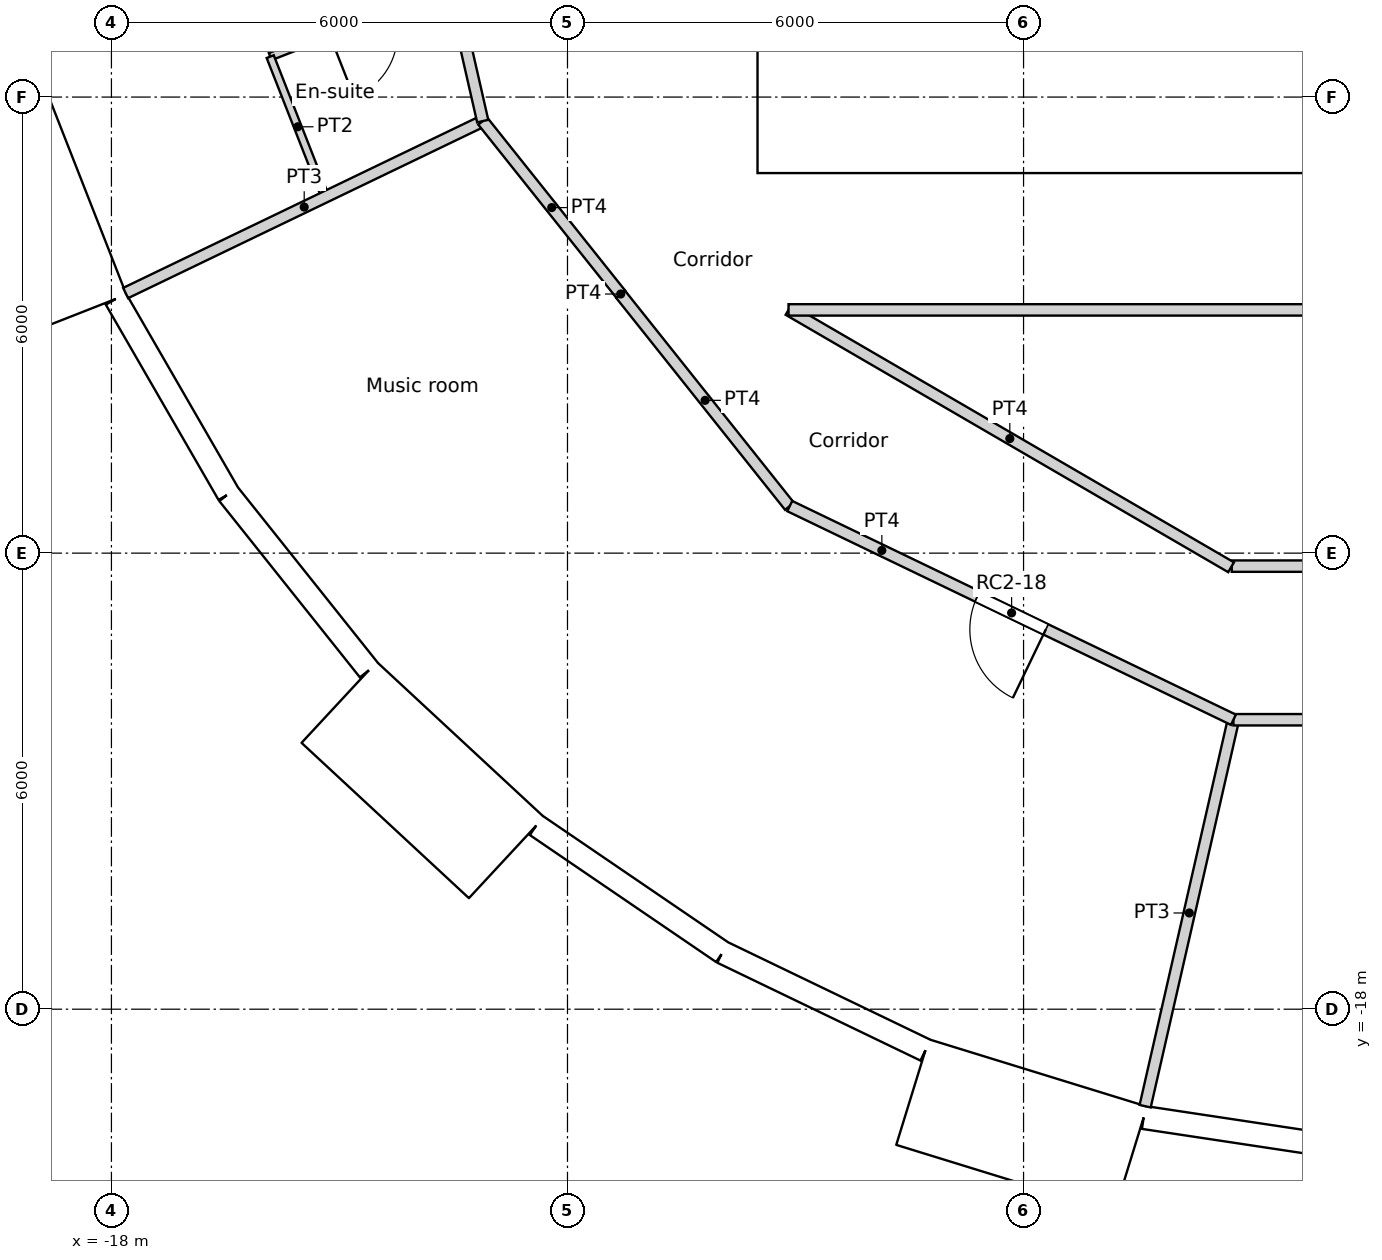
"""IFC4 building model, lengths in metres.
Left out: names, types, materials, properties, quantities, classifications, styles, units other than length and angle.
Written with IfcOpenShell. Run it as: python <this file> out.ifc"""

import sys

from ifc_helpers import new_model, si_unit, direction, frame, frame_2d, origin, origin_2d, place, context, subcontext, project, spatial, rectangle, circle, extrude, element, fill, save


model = new_model("IFC4")
c1 = context("Model", 3, precision=1e-05, world=origin(), true_north=direction((0.0, 1.0)))
c2 = subcontext(c1, "Body", "Model", "MODEL_VIEW")
j1 = project(units=[si_unit("LENGTHUNIT", "METRE"), si_unit("PLANEANGLEUNIT", "RADIAN")], contexts=[c1])
p1 = place(None, origin())
s1 = spatial("IfcSite", under=j1, at=p1, CompositionType="ELEMENT")
p2 = place(p1, origin())
s2 = spatial("IfcBuilding", under=s1, at=p2, CompositionType="ELEMENT")
p3 = place(p2, frame((0.0, 0.0, 241.8)))
s3 = spatial("IfcBuildingStorey", under=s2, at=p3, CompositionType="ELEMENT", Elevation=241.8)
for number, where, z_axis, x_axis in (
    (1, (-16.958, -8.167, 0.0), (0.0, 0.0, 1.0), (1.0, 0.0, 0.0)),
    (2, (-13.798, -12.802, 0.0), (0.0, 0.0, 1.0), (1.0, 0.0, 0.0)),
    (3, (-9.411, -16.301, 0.0), (0.0, 0.0, 1.0), (1.0, 0.0, 0.0)),
    (4, (-4.188, -18.35, 0.0), (0.0, 0.0, 1.0), (1.0, 0.0, 0.0)),
):
    element("IfcColumn", number, at=place(p3, frame(where, z_axis=z_axis, x_axis=x_axis)), inside=s3, PredefinedType="COLUMN", context=c2, shape_type="SweptSolid", body=[
        extrude(circle(Radius=0.55, at=origin_2d()), origin(), (0.0, 0.0, 1.0), 3.6),
    ])
p4 = place(p3, frame((-19.576, -6.072, -0.35), z_axis=(0.0, 0.0, 1.0), x_axis=(0.36537792632, -0.93085926485, 0.0)))
e5 = element("IfcWall", 5, at=p4, inside=s3, PredefinedType="ELEMENTEDWALL", context=c2, shape_type="SweptSolid", body=[
    extrude(rectangle(XDim=3.0, YDim=1.45, at=frame_2d((1.5, 0.0))), origin(), (0.0, 0.0, 1.0), 3.6),
])
p5 = place(p4, frame((1.5, 0.0, 1.9)))
e6 = element("IfcOpeningElement", 6, at=p5, cuts=e5, PredefinedType="OPENING", context=c2, shape_type="SweptSolid", body=[
    extrude(circle(Radius=0.9, at=origin_2d()), frame((0.0, 0.735, 0.0), z_axis=(0.0, -1.0, 0.0), x_axis=(1.0, 0.0, 0.0)), (0.0, 0.0, 1.0), 1.47),
])
p6 = place(p3, frame((-17.941, -8.657, 0.0), z_axis=(0.0, 0.0, 1.0), x_axis=(0.499950756475, -0.86605383268, 0.0)))
e7 = element("IfcWall", 7, at=p6, inside=s3, PredefinedType="SOLIDWALL", context=c2, shape_type="SweptSolid", body=[
    extrude(rectangle(XDim=2.962, YDim=0.3, at=frame_2d((1.481, 0.0))), origin(), (0.0, 0.0, 1.0), 3.25),
])
p7 = place(p6, frame((1.481, 0.0, 1.55)))
e8 = element("IfcOpeningElement", 8, at=p7, cuts=e7, PredefinedType="OPENING", context=c2, shape_type="SweptSolid", body=[
    extrude(circle(Radius=0.9, at=origin_2d()), frame((0.0, 0.16, 0.0), z_axis=(0.0, -1.0, 0.0), x_axis=(1.0, 0.0, 0.0)), (0.0, 0.0, 1.0), 0.32),
])
p8 = place(p3, frame((-16.46, -11.222, 0.0), z_axis=(0.0, 0.0, 1.0), x_axis=(0.623498236992, -0.781824755599, 0.0)))
e9 = element("IfcWall", 9, at=p8, inside=s3, PredefinedType="SOLIDWALL", context=c2, shape_type="SweptSolid", body=[
    extrude(rectangle(XDim=2.962, YDim=0.3, at=frame_2d((1.481, 0.0))), origin(), (0.0, 0.0, 1.0), 3.25),
])
p9 = place(p8, frame((1.481, 0.0, 1.55)))
e10 = element("IfcOpeningElement", 10, at=p9, cuts=e9, PredefinedType="OPENING", context=c2, shape_type="SweptSolid", body=[
    extrude(circle(Radius=0.9, at=origin_2d()), frame((0.0, 0.16, 0.0), z_axis=(0.0, -1.0, 0.0), x_axis=(1.0, 0.0, 0.0)), (0.0, 0.0, 1.0), 0.32),
])
p10 = place(p3, frame((-15.003, -13.964, -0.35), z_axis=(0.0, 0.0, 1.0), x_axis=(0.733022439167, -0.680204457261, 0.0)))
e11 = element("IfcWall", 11, at=p10, inside=s3, PredefinedType="ELEMENTEDWALL", context=c2, shape_type="SweptSolid", body=[
    extrude(rectangle(XDim=3.0, YDim=1.45, at=frame_2d((1.5, 0.0))), origin(), (0.0, 0.0, 1.0), 3.6),
])
p11 = place(p10, frame((1.5, 0.0, 1.9)))
e12 = element("IfcOpeningElement", 12, at=p11, cuts=e11, PredefinedType="OPENING", context=c2, shape_type="SweptSolid", body=[
    extrude(circle(Radius=0.9, at=origin_2d()), frame((0.0, 0.735, 0.0), z_axis=(0.0, -1.0, 0.0), x_axis=(1.0, 0.0, 0.0)), (0.0, 0.0, 1.0), 1.47),
])
p12 = place(p3, frame((-12.408, -15.584, 0.0), z_axis=(0.0, 0.0, 1.0), x_axis=(0.826236061068, -0.563324037646, 0.0)))
e13 = element("IfcWall", 13, at=p12, inside=s3, PredefinedType="SOLIDWALL", context=c2, shape_type="SweptSolid", body=[
    extrude(rectangle(XDim=2.962, YDim=0.3, at=frame_2d((1.481, 0.0))), origin(), (0.0, 0.0, 1.0), 3.25),
])
p13 = place(p12, frame((1.481, 0.0, 1.55)))
e14 = element("IfcOpeningElement", 14, at=p13, cuts=e13, PredefinedType="OPENING", context=c2, shape_type="SweptSolid", body=[
    extrude(circle(Radius=0.9, at=origin_2d()), frame((0.0, 0.16, 0.0), z_axis=(0.0, -1.0, 0.0), x_axis=(1.0, 0.0, 0.0)), (0.0, 0.0, 1.0), 0.32),
])
p14 = place(p3, frame((-9.961, -17.253, 0.0), z_axis=(0.0, 0.0, 1.0), x_axis=(0.90095513435, -0.433912255978, 0.0)))
e15 = element("IfcWall", 15, at=p14, inside=s3, PredefinedType="SOLIDWALL", context=c2, shape_type="SweptSolid", body=[
    extrude(rectangle(XDim=2.962, YDim=0.3, at=frame_2d((1.481, 0.0))), origin(), (0.0, 0.0, 1.0), 3.25),
])
p15 = place(p14, frame((1.481, 0.0, 1.55)))
e16 = element("IfcOpeningElement", 16, at=p15, cuts=e15, PredefinedType="OPENING", context=c2, shape_type="SweptSolid", body=[
    extrude(circle(Radius=0.9, at=origin_2d()), frame((0.0, 0.16, 0.0), z_axis=(0.0, -1.0, 0.0), x_axis=(1.0, 0.0, 0.0)), (0.0, 0.0, 1.0), 0.32),
])
p16 = place(p3, frame((-7.458, -19.091, -0.35), z_axis=(0.0, 0.0, 1.0), x_axis=(0.955571139978, -0.294760574774, 0.0)))
e17 = element("IfcWall", 17, at=p16, inside=s3, PredefinedType="ELEMENTEDWALL", context=c2, shape_type="SweptSolid", body=[
    extrude(rectangle(XDim=3.0, YDim=1.45, at=frame_2d((1.5, 0.0))), origin(), (0.0, 0.0, 1.0), 3.6),
])
p17 = place(p16, frame((1.5, 0.0, 1.9)))
e18 = element("IfcOpeningElement", 18, at=p17, cuts=e17, PredefinedType="OPENING", context=c2, shape_type="SweptSolid", body=[
    extrude(circle(Radius=0.9, at=origin_2d()), frame((0.0, 0.735, 0.0), z_axis=(0.0, -1.0, 0.0), x_axis=(1.0, 0.0, 0.0)), (0.0, 0.0, 1.0), 1.47),
])
p18 = place(p3, frame((-4.418, -19.425, 0.0), z_axis=(0.0, 0.0, 1.0), x_axis=(0.988835775663, -0.149009425104, 0.0)))
e19 = element("IfcWall", 19, at=p18, inside=s3, PredefinedType="SOLIDWALL", context=c2, shape_type="SweptSolid", body=[
    extrude(rectangle(XDim=2.962, YDim=0.3, at=frame_2d((1.481, 0.0))), origin(), (0.0, 0.0, 1.0), 3.25),
])
p19 = place(p18, frame((1.481, 0.0, 1.55)))
e20 = element("IfcOpeningElement", 20, at=p19, cuts=e19, PredefinedType="OPENING", context=c2, shape_type="SweptSolid", body=[
    extrude(circle(Radius=0.9, at=origin_2d()), frame((0.0, 0.16, 0.0), z_axis=(0.0, -1.0, 0.0), x_axis=(1.0, 0.0, 0.0)), (0.0, 0.0, 1.0), 0.32),
])
p20 = place(p3, frame((-9.5, -6.7, 0.0), z_axis=(0.0, 0.0, 1.0), x_axis=(1.0, 0.0, 0.0)))
e21 = element("IfcWall", 21, at=p20, inside=s3, PredefinedType="SOLIDWALL", context=c2, shape_type="SweptSolid", body=[
    extrude(rectangle(XDim=19.0, YDim=0.6, at=frame_2d((9.5, 0.0))), origin(), (0.0, 0.0, 1.0), 3.6),
])
p21 = place(p20, frame((10.4, 0.0, 0.0)))
e22 = element("IfcOpeningElement", 22, at=p21, cuts=e21, PredefinedType="OPENING", context=c2, shape_type="SweptSolid", body=[
    extrude(rectangle(XDim=1.0, YDim=2.1, at=frame_2d((0.5, 1.05))), frame((0.0, 0.3, 0.0), z_axis=(0.0, -1.0, 0.0), x_axis=(1.0, 0.0, 0.0)), (0.0, 0.0, 1.0), 0.6),
])
p22 = place(p20, frame((5.35, 0.0, 0.0)))
e23 = element("IfcOpeningElement", 23, at=p22, cuts=e21, PredefinedType="OPENING", context=c2, shape_type="SweptSolid", body=[
    extrude(rectangle(XDim=1.7, YDim=2.1, at=frame_2d((0.85, 1.05))), frame((0.0, 0.3, 0.0), z_axis=(0.0, -1.0, 0.0), x_axis=(1.0, 0.0, 0.0)), (0.0, 0.0, 1.0), 0.6),
])
p23 = place(p20, frame((11.95, 0.0, 0.0)))
e24 = element("IfcOpeningElement", 24, at=p23, cuts=e21, PredefinedType="OPENING", context=c2, shape_type="SweptSolid", body=[
    extrude(rectangle(XDim=1.7, YDim=2.1, at=frame_2d((0.85, 1.05))), frame((0.0, 0.3, 0.0), z_axis=(0.0, -1.0, 0.0), x_axis=(1.0, 0.0, 0.0)), (0.0, 0.0, 1.0), 0.6),
])
p24 = place(p3, frame((-9.2, -6.4, 0.0), z_axis=(0.0, 0.0, 1.0), x_axis=(0.0, 1.0, 0.0)))
e25 = element("IfcWall", 25, at=p24, inside=s3, PredefinedType="SOLIDWALL", context=c2, shape_type="SweptSolid", body=[
    extrude(rectangle(XDim=12.8, YDim=0.6, at=frame_2d((6.4, 0.0))), origin(), (0.0, 0.0, 1.0), 3.6),
])
p25 = place(p3, frame((-2.25, -6.4, 0.0), z_axis=(0.0, 0.0, 1.0), x_axis=(0.0, 1.0, 0.0)))
e26 = element("IfcWall", 26, at=p25, inside=s3, PredefinedType="SOLIDWALL", context=c2, shape_type="SweptSolid", body=[
    extrude(rectangle(XDim=3.15, YDim=0.3, at=frame_2d((1.575, 0.0))), origin(), (0.0, 0.0, 1.0), 3.25),
])
p26 = place(p3, frame((-9.092, -8.8, 0.0), z_axis=(0.0, 0.0, 1.0), x_axis=(1.0, 0.0, 0.0)))
e27 = element("IfcWall", 27, at=p26, inside=s3, PredefinedType="PARTITIONING", context=c2, shape_type="SweptSolid", body=[
    extrude(rectangle(XDim=18.193, YDim=0.15, at=frame_2d((9.096, 0.0))), origin(), (0.0, 0.0, 1.0), 3.25),
])
p27 = place(p26, frame((8.592, 0.0, 0.0)))
e28 = element("IfcOpeningElement", 28, at=p27, cuts=e27, PredefinedType="OPENING", context=c2, shape_type="SweptSolid", body=[
    extrude(rectangle(XDim=1.0, YDim=2.04, at=frame_2d((0.5, 1.02))), frame((0.0, 0.075, 0.0), z_axis=(0.0, -1.0, 0.0), x_axis=(1.0, 0.0, 0.0)), (0.0, 0.0, 1.0), 0.15),
])
p28 = place(p3, frame((-9.092, -8.8, 0.0), z_axis=(0.0, 0.0, 1.0), x_axis=(0.864470922103, -0.502682827277, 0.0)))
e29 = element("IfcWall", 29, at=p28, inside=s3, PredefinedType="PARTITIONING", context=c2, shape_type="SweptSolid", body=[
    extrude(rectangle(XDim=6.735, YDim=0.15, at=frame_2d((3.368, 0.0))), origin(), (0.0, 0.0, 1.0), 3.25),
])
p29 = place(p3, frame((-11.3, -8.596, 0.0), z_axis=(0.0, 0.0, 1.0), x_axis=(0.623165080354, -0.782090328944, 0.0)))
e30 = element("IfcWall", 30, at=p29, inside=s3, PredefinedType="PARTITIONING", context=c2, shape_type="SweptSolid", body=[
    extrude(rectangle(XDim=3.564, YDim=0.15, at=frame_2d((1.782, 0.0))), origin(), (0.0, 0.0, 1.0), 3.25),
])
p30 = place(p3, frame((-11.3, -8.596, 0.0), z_axis=(0.0, 0.0, 1.0), x_axis=(0.0, 1.0, 0.0)))
e31 = element("IfcWall", 31, at=p30, inside=s3, PredefinedType="PARTITIONING", context=c2, shape_type="SweptSolid", body=[
    extrude(rectangle(XDim=0.01, YDim=0.15, at=frame_2d((0.005, 0.0))), origin(), (0.0, 0.0, 1.0), 3.25),
])
p31 = place(p3, frame((-14.557, 0.0, 0.0), z_axis=(0.0, 0.0, 1.0), x_axis=(0.222489165471, -0.974935162587, 0.0)))
e32 = element("IfcWall", 32, at=p31, inside=s3, PredefinedType="PARTITIONING", context=c2, shape_type="SweptSolid", body=[
    extrude(rectangle(XDim=6.479, YDim=0.15, at=frame_2d((3.239, 0.0))), origin(), (0.0, 0.0, 1.0), 3.25),
])
p32 = place(p31, frame((0.59, 0.0, 0.0)))
e33 = element("IfcOpeningElement", 33, at=p32, cuts=e32, PredefinedType="OPENING", context=c2, shape_type="SweptSolid", body=[
    extrude(rectangle(XDim=1.0, YDim=2.1, at=frame_2d((0.5, 1.05))), frame((0.0, 0.075, 0.0), z_axis=(0.0, -1.0, 0.0), x_axis=(1.0, 0.0, 0.0)), (0.0, 0.0, 1.0), 0.15),
])
p33 = place(p31, frame((2.912, 0.0, 0.0)))
e34 = element("IfcOpeningElement", 34, at=p33, cuts=e32, PredefinedType="OPENING", context=c2, shape_type="SweptSolid", body=[
    extrude(rectangle(XDim=1.0, YDim=2.1, at=frame_2d((0.5, 1.05))), frame((0.0, 0.075, 0.0), z_axis=(0.0, -1.0, 0.0), x_axis=(1.0, 0.0, 0.0)), (0.0, 0.0, 1.0), 0.15),
])
p34 = place(p3, frame((-13.115, -6.316, 0.0), z_axis=(0.0, 0.0, 1.0), x_axis=(0.623446514299, -0.781866001185, 0.0)))
e35 = element("IfcWall", 35, at=p34, inside=s3, PredefinedType="PARTITIONING", context=c2, shape_type="SweptSolid", body=[
    extrude(rectangle(XDim=2.911, YDim=0.15, at=frame_2d((1.456, 0.0))), origin(), (0.0, 0.0, 1.0), 3.25),
])
p35 = place(p3, frame((-3.261, -12.171, 0.0), z_axis=(0.0, 0.0, 1.0), x_axis=(1.0, 0.0, 0.0)))
e36 = element("IfcWall", 36, at=p35, inside=s3, PredefinedType="PARTITIONING", context=c2, shape_type="SweptSolid", body=[
    extrude(rectangle(XDim=6.522, YDim=0.15, at=frame_2d((3.261, 0.0))), origin(), (0.0, 0.0, 1.0), 3.25),
])
p36 = place(p3, frame((-9.076, -11.381, 0.0), z_axis=(0.0, 0.0, 1.0), x_axis=(0.900976027191, -0.433868872388, 0.0)))
e37 = element("IfcWall", 37, at=p36, inside=s3, PredefinedType="PARTITIONING", context=c2, shape_type="SweptSolid", body=[
    extrude(rectangle(XDim=6.479, YDim=0.15, at=frame_2d((3.239, 0.0))), origin(), (0.0, 0.0, 1.0), 3.25),
])
p37 = place(p36, frame((2.74, 0.0, 0.0)))
e38 = element("IfcOpeningElement", 38, at=p37, cuts=e37, PredefinedType="OPENING", context=c2, shape_type="SweptSolid", body=[
    extrude(rectangle(XDim=1.0, YDim=2.04, at=frame_2d((0.5, 1.02))), frame((0.0, 0.075, 0.0), z_axis=(0.0, -1.0, 0.0), x_axis=(1.0, 0.0, 0.0)), (0.0, 0.0, 1.0), 0.15),
])
p38 = place(p3, frame((-3.239, -14.192, 0.0), z_axis=(0.0, 0.0, 1.0), x_axis=(1.0, 0.0, 0.0)))
e39 = element("IfcWall", 39, at=p38, inside=s3, PredefinedType="PARTITIONING", context=c2, shape_type="SweptSolid", body=[
    extrude(rectangle(XDim=6.478, YDim=0.15, at=frame_2d((3.239, 0.0))), origin(), (0.0, 0.0, 1.0), 3.25),
])
p39 = place(p3, frame((-15.911, -5.468, 0.0), z_axis=(0.0, 0.0, 1.0), x_axis=(0.930898333543, 0.365278376867, 0.0)))
e40 = element("IfcWall", 40, at=p39, inside=s3, PredefinedType="PARTITIONING", context=c2, shape_type="SweptSolid", body=[
    extrude(rectangle(XDim=2.565, YDim=0.1, at=frame_2d((1.283, 0.0))), origin(), (0.0, 0.0, 1.0), 3.25),
])
p40 = place(p39, frame((0.832, 0.0, 0.0)))
e41 = element("IfcOpeningElement", 41, at=p40, cuts=e40, PredefinedType="OPENING", context=c2, shape_type="SweptSolid", body=[
    extrude(rectangle(XDim=0.9, YDim=2.04, at=frame_2d((0.45, 1.02))), frame((0.0, 0.05, 0.0), z_axis=(0.0, -1.0, 0.0), x_axis=(1.0, 0.0, 0.0)), (0.0, 0.0, 1.0), 0.1),
])
p41 = place(p3, frame((-15.911, -5.468, 0.0), z_axis=(0.0, 0.0, 1.0), x_axis=(0.36507706633, -0.930977301356, 0.0)))
e42 = element("IfcWall", 42, at=p41, inside=s3, PredefinedType="PARTITIONING", context=c2, shape_type="SweptSolid", body=[
    extrude(rectangle(XDim=1.983, YDim=0.1, at=frame_2d((0.991, 0.0))), origin(), (0.0, 0.0, 1.0), 3.25),
])
p42 = place(p3, frame((-17.813, -8.578, 0.0), z_axis=(0.0, 0.0, 1.0), x_axis=(0.901049790108, 0.433715662325, 0.0)))
e43 = element("IfcWall", 43, at=p42, inside=s3, PredefinedType="PARTITIONING", context=c2, shape_type="SweptSolid", body=[
    extrude(rectangle(XDim=5.214, YDim=0.15, at=frame_2d((2.607, 0.0))), origin(), (0.0, 0.0, 1.0), 3.25),
])
p43 = place(p3, frame((-4.4, -19.276, 0.0), z_axis=(0.0, 0.0, 1.0), x_axis=(0.222612505682, 0.974907007008, 0.0)))
e44 = element("IfcWall", 44, at=p43, inside=s3, PredefinedType="PARTITIONING", context=c2, shape_type="SweptSolid", body=[
    extrude(rectangle(XDim=5.215, YDim=0.15, at=frame_2d((2.607, 0.0))), origin(), (0.0, 0.0, 1.0), 3.25),
])
p44 = place(p5, origin())
e45 = element("IfcWindow", 45, at=p44, inside=s3, PartitioningType="SINGLE_PANEL", PredefinedType="WINDOW", context=c2, shape_type="SweptSolid", body=[
    extrude(circle(Radius=0.9, at=origin_2d()), frame((0.0, 0.695, 0.0), z_axis=(0.0, -1.0, 0.0), x_axis=(1.0, 0.0, 0.0)), (0.0, 0.0, 1.0), 0.1),
])
fill(e6, e45)
p45 = place(p7, origin())
e46 = element("IfcWindow", 46, at=p45, inside=s3, PartitioningType="SINGLE_PANEL", PredefinedType="WINDOW", context=c2, shape_type="SweptSolid", body=[
    extrude(circle(Radius=0.9, at=origin_2d()), frame((0.0, 0.12, 0.0), z_axis=(0.0, -1.0, 0.0), x_axis=(1.0, 0.0, 0.0)), (0.0, 0.0, 1.0), 0.1),
])
fill(e8, e46)
p46 = place(p9, origin())
e47 = element("IfcWindow", 47, at=p46, inside=s3, PartitioningType="SINGLE_PANEL", PredefinedType="WINDOW", context=c2, shape_type="SweptSolid", body=[
    extrude(circle(Radius=0.9, at=origin_2d()), frame((0.0, 0.12, 0.0), z_axis=(0.0, -1.0, 0.0), x_axis=(1.0, 0.0, 0.0)), (0.0, 0.0, 1.0), 0.1),
])
fill(e10, e47)
p47 = place(p11, origin())
e48 = element("IfcWindow", 48, at=p47, inside=s3, PartitioningType="SINGLE_PANEL", PredefinedType="WINDOW", context=c2, shape_type="SweptSolid", body=[
    extrude(circle(Radius=0.9, at=origin_2d()), frame((0.0, 0.695, 0.0), z_axis=(0.0, -1.0, 0.0), x_axis=(1.0, 0.0, 0.0)), (0.0, 0.0, 1.0), 0.1),
])
fill(e12, e48)
p48 = place(p13, origin())
e49 = element("IfcWindow", 49, at=p48, inside=s3, PartitioningType="SINGLE_PANEL", PredefinedType="WINDOW", context=c2, shape_type="SweptSolid", body=[
    extrude(circle(Radius=0.9, at=origin_2d()), frame((0.0, 0.12, 0.0), z_axis=(0.0, -1.0, 0.0), x_axis=(1.0, 0.0, 0.0)), (0.0, 0.0, 1.0), 0.1),
])
fill(e14, e49)
p49 = place(p15, origin())
e50 = element("IfcWindow", 50, at=p49, inside=s3, PartitioningType="SINGLE_PANEL", PredefinedType="WINDOW", context=c2, shape_type="SweptSolid", body=[
    extrude(circle(Radius=0.9, at=origin_2d()), frame((0.0, 0.12, 0.0), z_axis=(0.0, -1.0, 0.0), x_axis=(1.0, 0.0, 0.0)), (0.0, 0.0, 1.0), 0.1),
])
fill(e16, e50)
p50 = place(p17, origin())
e51 = element("IfcWindow", 51, at=p50, inside=s3, PartitioningType="SINGLE_PANEL", PredefinedType="WINDOW", context=c2, shape_type="SweptSolid", body=[
    extrude(circle(Radius=0.9, at=origin_2d()), frame((0.0, 0.695, 0.0), z_axis=(0.0, -1.0, 0.0), x_axis=(1.0, 0.0, 0.0)), (0.0, 0.0, 1.0), 0.1),
])
fill(e18, e51)
p51 = place(p19, origin())
e52 = element("IfcWindow", 52, at=p51, inside=s3, PartitioningType="SINGLE_PANEL", PredefinedType="WINDOW", context=c2, shape_type="SweptSolid", body=[
    extrude(circle(Radius=0.9, at=origin_2d()), frame((0.0, 0.12, 0.0), z_axis=(0.0, -1.0, 0.0), x_axis=(1.0, 0.0, 0.0)), (0.0, 0.0, 1.0), 0.1),
])
fill(e20, e52)
p52 = place(p22, origin())
e53 = element("IfcDoor", 53, at=p52, inside=s3, OperationType="DOUBLE_DOOR_SINGLE_SWING", PredefinedType="DOOR", context=c2, shape_type="SweptSolid", body=[
    extrude(rectangle(XDim=1.7, YDim=2.1, at=frame_2d((0.85, 1.05))), frame((0.0, 0.025, 0.0), z_axis=(0.0, -1.0, 0.0), x_axis=(1.0, 0.0, 0.0)), (0.0, 0.0, 1.0), 0.05),
])
fill(e23, e53)
p53 = place(p37, origin())
e54 = element("IfcDoor", 54, at=p53, inside=s3, OperationType="SINGLE_SWING_LEFT", PredefinedType="DOOR", context=c2, shape_type="SweptSolid", body=[
    extrude(rectangle(XDim=1.0, YDim=2.04, at=frame_2d((0.5, 1.02))), frame((0.0, 0.025, 0.0), z_axis=(0.0, -1.0, 0.0), x_axis=(1.0, 0.0, 0.0)), (0.0, 0.0, 1.0), 0.05),
])
fill(e38, e54)
save(model, sys.argv[1])
